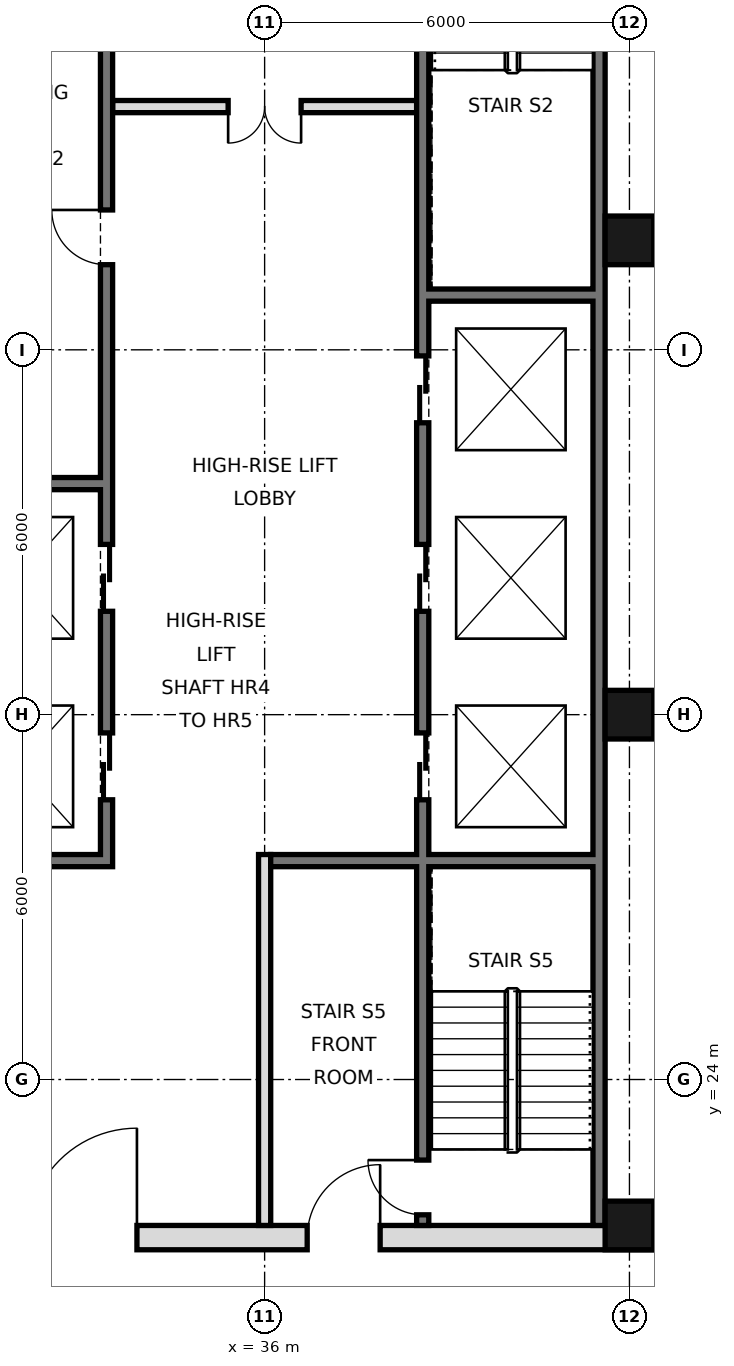
"""IFC4 building model, lengths in metres.
Left out: names, types, materials, properties, quantities, classifications, styles, units other than length and angle.
Written with IfcOpenShell. Run it as: python <this file> out.ifc"""

import sys

from ifc_helpers import new_model, si_unit, direction, frame, frame_2d, origin, origin_2d, place, context, subcontext, project, spatial, rectangle, hollow_rectangle, extrude, element, fill, save


model = new_model("IFC4")
c1 = context("Model", 3, precision=1e-05, world=origin(), true_north=direction((0.0, 1.0)))
c2 = subcontext(c1, "Body", "Model", "MODEL_VIEW")
j1 = project(units=[si_unit("LENGTHUNIT", "METRE"), si_unit("PLANEANGLEUNIT", "RADIAN")], contexts=[c1])
p1 = place(None, origin())
s1 = spatial("IfcSite", under=j1, at=p1, CompositionType="ELEMENT")
p2 = place(p1, origin())
s2 = spatial("IfcBuilding", under=s1, at=p2, CompositionType="ELEMENT")
p3 = place(p2, frame((0.0, 0.0, 323.2)))
s3 = spatial("IfcBuildingStorey", under=s2, at=p3, CompositionType="ELEMENT", Elevation=323.2)
for number, where, z_axis, x_axis in (
    (1, (42.0, 21.6, 0.0), (0.0, 0.0, 1.0), (1.0, 0.0, 0.0)),
    (2, (42.0, 30.0, 0.0), (0.0, 0.0, 1.0), (1.0, 0.0, 0.0)),
    (3, (42.0, 37.8, 0.0), (0.0, 0.0, 1.0), (1.0, 0.0, 0.0)),
):
    element("IfcColumn", number, at=place(p3, frame(where, z_axis=z_axis, x_axis=x_axis)), inside=s3, PredefinedType="COLUMN", context=c2, shape_type="SweptSolid", body=[
        extrude(hollow_rectangle(XDim=0.8, YDim=0.8, WallThickness=0.025, at=origin_2d()), origin(), (0.0, 0.0, 1.0), 3.6),
    ])
p4 = place(p3, frame((41.5, 21.6, 0.0), z_axis=(0.0, 0.0, 1.0), x_axis=(0.0, 1.0, 0.0)))
e4 = element("IfcWall", 4, at=p4, inside=s3, PredefinedType="SOLIDWALL", context=c2, shape_type="SweptSolid", body=[
    extrude(rectangle(XDim=23.5, YDim=0.2, at=frame_2d((11.75, 0.0))), origin(), (0.0, 0.0, 1.0), 3.42),
])
p5 = place(p3, frame((5.6, 21.4, 0.0), z_axis=(0.0, 0.0, 1.0), x_axis=(1.0, 0.0, 0.0)))
e5 = element("IfcWall", 5, at=p5, inside=s3, PredefinedType="SOLIDWALL", context=c2, shape_type="SweptSolid", body=[
    extrude(rectangle(XDim=36.8, YDim=0.4, at=frame_2d((18.4, 0.0))), origin(), (0.0, 0.0, 1.0), 3.42),
])
p6 = place(p5, frame((8.5, 0.0, 0.0)))
e6 = element("IfcOpeningElement", 6, at=p6, cuts=e5, PredefinedType="OPENING", context=c2, shape_type="SweptSolid", body=[
    extrude(rectangle(XDim=1.8, YDim=2.1, at=frame_2d((0.9, 1.05))), frame((0.0, 0.21, 0.0), z_axis=(0.0, -1.0, 0.0), x_axis=(1.0, 0.0, 0.0)), (0.0, 0.0, 1.0), 0.42),
])
p7 = place(p5, frame((17.5, 0.0, 0.0)))
e7 = element("IfcOpeningElement", 7, at=p7, cuts=e5, PredefinedType="OPENING", context=c2, shape_type="SweptSolid", body=[
    extrude(rectangle(XDim=1.8, YDim=2.1, at=frame_2d((0.9, 1.05))), frame((0.0, 0.21, 0.0), z_axis=(0.0, -1.0, 0.0), x_axis=(1.0, 0.0, 0.0)), (0.0, 0.0, 1.0), 0.42),
])
p8 = place(p5, frame((26.5, 0.0, 0.0)))
e8 = element("IfcOpeningElement", 8, at=p8, cuts=e5, PredefinedType="OPENING", context=c2, shape_type="SweptSolid", body=[
    extrude(rectangle(XDim=1.8, YDim=2.1, at=frame_2d((0.9, 1.05))), frame((0.0, 0.21, 0.0), z_axis=(0.0, -1.0, 0.0), x_axis=(1.0, 0.0, 0.0)), (0.0, 0.0, 1.0), 0.42),
])
p9 = place(p5, frame((4.5, 0.0, 0.0)))
e9 = element("IfcOpeningElement", 9, at=p9, cuts=e5, PredefinedType="OPENING", context=c2, shape_type="SweptSolid", body=[
    extrude(rectangle(XDim=1.2, YDim=2.1, at=frame_2d((0.6, 1.05))), frame((0.0, 0.21, 0.0), z_axis=(0.0, -1.0, 0.0), x_axis=(1.0, 0.0, 0.0)), (0.0, 0.0, 1.0), 0.42),
])
p10 = place(p5, frame((31.1, 0.0, 0.0)))
e10 = element("IfcOpeningElement", 10, at=p10, cuts=e5, PredefinedType="OPENING", context=c2, shape_type="SweptSolid", body=[
    extrude(rectangle(XDim=1.2, YDim=2.1, at=frame_2d((0.6, 1.05))), frame((0.0, 0.21, 0.0), z_axis=(0.0, -1.0, 0.0), x_axis=(1.0, 0.0, 0.0)), (0.0, 0.0, 1.0), 0.42),
])
p11 = place(p3, frame((33.4, 27.5, 0.0), z_axis=(0.0, 0.0, 1.0), x_axis=(0.0, 1.0, 0.0)))
e11 = element("IfcWall", 11, at=p11, inside=s3, PredefinedType="SOLIDWALL", context=c2, shape_type="SweptSolid", body=[
    extrude(rectangle(XDim=17.5, YDim=0.2, at=frame_2d((8.75, 0.0))), origin(), (0.0, 0.0, 1.0), 3.42),
])
p12 = place(p11, frame((1.1, 0.0, 0.0)))
e12 = element("IfcOpeningElement", 12, at=p12, cuts=e11, PredefinedType="OPENING", context=c2, shape_type="SweptSolid", body=[
    extrude(rectangle(XDim=1.1, YDim=2.1, at=frame_2d((0.55, 1.05))), frame((0.0, 0.11, 0.0), z_axis=(0.0, -1.0, 0.0), x_axis=(1.0, 0.0, 0.0)), (0.0, 0.0, 1.0), 0.22),
])
p13 = place(p11, frame((4.2, 0.0, 0.0)))
e13 = element("IfcOpeningElement", 13, at=p13, cuts=e11, PredefinedType="OPENING", context=c2, shape_type="SweptSolid", body=[
    extrude(rectangle(XDim=1.1, YDim=2.1, at=frame_2d((0.55, 1.05))), frame((0.0, 0.11, 0.0), z_axis=(0.0, -1.0, 0.0), x_axis=(1.0, 0.0, 0.0)), (0.0, 0.0, 1.0), 0.22),
])
p14 = place(p11, frame((15.4, 0.0, 0.0)))
e14 = element("IfcOpeningElement", 14, at=p14, cuts=e11, PredefinedType="OPENING", context=c2, shape_type="SweptSolid", body=[
    extrude(rectangle(XDim=1.1, YDim=2.1, at=frame_2d((0.55, 1.05))), frame((0.0, 0.11, 0.0), z_axis=(0.0, -1.0, 0.0), x_axis=(1.0, 0.0, 0.0)), (0.0, 0.0, 1.0), 0.22),
])
p15 = place(p11, frame((9.9, 0.0, 0.0)))
e15 = element("IfcOpeningElement", 15, at=p15, cuts=e11, PredefinedType="OPENING", context=c2, shape_type="SweptSolid", body=[
    extrude(rectangle(XDim=0.9, YDim=2.1, at=frame_2d((0.45, 1.05))), frame((0.0, 0.11, 0.0), z_axis=(0.0, -1.0, 0.0), x_axis=(1.0, 0.0, 0.0)), (0.0, 0.0, 1.0), 0.22),
])
p16 = place(p3, frame((36.0, 21.6, 0.0), z_axis=(0.0, 0.0, 1.0), x_axis=(0.0, 1.0, 0.0)))
e16 = element("IfcWall", 16, at=p16, inside=s3, PredefinedType="PARTITIONING", context=c2, shape_type="SweptSolid", body=[
    extrude(rectangle(XDim=6.1, YDim=0.2, at=frame_2d((3.05, 0.0))), origin(), (0.0, 0.0, 1.0), 3.42),
])
p17 = place(p3, frame((38.6, 21.6, 0.0), z_axis=(0.0, 0.0, 1.0), x_axis=(0.0, 1.0, 0.0)))
e17 = element("IfcWall", 17, at=p17, inside=s3, PredefinedType="SOLIDWALL", context=c2, shape_type="SweptSolid", body=[
    extrude(rectangle(XDim=23.4, YDim=0.2, at=frame_2d((11.7, 0.0))), origin(), (0.0, 0.0, 1.0), 3.42),
])
p18 = place(p17, frame((7.0, 0.0, 0.0)))
e18 = element("IfcOpeningElement", 18, at=p18, cuts=e17, PredefinedType="OPENING", context=c2, shape_type="SweptSolid", body=[
    extrude(rectangle(XDim=1.1, YDim=2.1, at=frame_2d((0.55, 1.05))), frame((0.0, 0.11, 0.0), z_axis=(0.0, -1.0, 0.0), x_axis=(1.0, 0.0, 0.0)), (0.0, 0.0, 1.0), 0.22),
])
p19 = place(p17, frame((10.1, 0.0, 0.0)))
e19 = element("IfcOpeningElement", 19, at=p19, cuts=e17, PredefinedType="OPENING", context=c2, shape_type="SweptSolid", body=[
    extrude(rectangle(XDim=1.1, YDim=2.1, at=frame_2d((0.55, 1.05))), frame((0.0, 0.11, 0.0), z_axis=(0.0, -1.0, 0.0), x_axis=(1.0, 0.0, 0.0)), (0.0, 0.0, 1.0), 0.22),
])
p20 = place(p17, frame((13.2, 0.0, 0.0)))
e20 = element("IfcOpeningElement", 20, at=p20, cuts=e17, PredefinedType="OPENING", context=c2, shape_type="SweptSolid", body=[
    extrude(rectangle(XDim=1.1, YDim=2.1, at=frame_2d((0.55, 1.05))), frame((0.0, 0.11, 0.0), z_axis=(0.0, -1.0, 0.0), x_axis=(1.0, 0.0, 0.0)), (0.0, 0.0, 1.0), 0.22),
])
p21 = place(p17, frame((22.1, 0.0, 0.0)))
e21 = element("IfcOpeningElement", 21, at=p21, cuts=e17, PredefinedType="OPENING", context=c2, shape_type="SweptSolid", body=[
    extrude(rectangle(XDim=1.0, YDim=2.1, at=frame_2d((0.5, 1.05))), frame((0.0, 0.11, 0.0), z_axis=(0.0, -1.0, 0.0), x_axis=(1.0, 0.0, 0.0)), (0.0, 0.0, 1.0), 0.22),
])
p22 = place(p17, frame((0.175, 0.0, 0.0)))
e22 = element("IfcOpeningElement", 22, at=p22, cuts=e17, PredefinedType="OPENING", context=c2, shape_type="SweptSolid", body=[
    extrude(rectangle(XDim=0.9, YDim=2.1, at=frame_2d((0.45, 1.05))), frame((0.0, 0.11, 0.0), z_axis=(0.0, -1.0, 0.0), x_axis=(1.0, 0.0, 0.0)), (0.0, 0.0, 1.0), 0.22),
])
p23 = place(p3, frame((30.6, 27.6, 0.0), z_axis=(0.0, 0.0, 1.0), x_axis=(1.0, 0.0, 0.0)))
e23 = element("IfcWall", 23, at=p23, inside=s3, PredefinedType="SOLIDWALL", context=c2, shape_type="SweptSolid", body=[
    extrude(rectangle(XDim=2.7, YDim=0.2, at=frame_2d((1.35, 0.0))), origin(), (0.0, 0.0, 1.0), 3.42),
])
p24 = place(p3, frame((36.1, 27.6, 0.0), z_axis=(0.0, 0.0, 1.0), x_axis=(1.0, 0.0, 0.0)))
e24 = element("IfcWall", 24, at=p24, inside=s3, PredefinedType="SOLIDWALL", context=c2, shape_type="SweptSolid", body=[
    extrude(rectangle(XDim=5.3, YDim=0.2, at=frame_2d((2.65, 0.0))), origin(), (0.0, 0.0, 1.0), 3.42),
])
for number, where, z_axis, x_axis in (
    (25, (30.6, 33.8, 0.0), (0.0, 0.0, 1.0), (1.0, 0.0, 0.0)),
    (26, (38.7, 36.9, 0.0), (0.0, 0.0, 1.0), (1.0, 0.0, 0.0)),
):
    element("IfcWall", number, at=place(p3, frame(where, z_axis=z_axis, x_axis=x_axis)), inside=s3, PredefinedType="SOLIDWALL", context=c2, shape_type="SweptSolid", body=[
        extrude(rectangle(XDim=2.7, YDim=0.2, at=frame_2d((1.35, 0.0))), origin(), (0.0, 0.0, 1.0), 3.42),
    ])
p25 = place(p3, frame((33.5, 40.0, 0.0), z_axis=(0.0, 0.0, 1.0), x_axis=(1.0, 0.0, 0.0)))
e27 = element("IfcWall", 27, at=p25, inside=s3, PredefinedType="PARTITIONING", context=c2, shape_type="SweptSolid", body=[
    extrude(rectangle(XDim=5.0, YDim=0.2, at=frame_2d((2.5, 0.0))), origin(), (0.0, 0.0, 1.0), 3.42),
])
p26 = place(p25, frame((1.9, 0.0, 0.0)))
e28 = element("IfcOpeningElement", 28, at=p26, cuts=e27, PredefinedType="OPENING", context=c2, shape_type="SweptSolid", body=[
    extrude(rectangle(XDim=1.2, YDim=2.1, at=frame_2d((0.6, 1.05))), frame((0.0, 0.11, 0.0), z_axis=(0.0, -1.0, 0.0), x_axis=(1.0, 0.0, 0.0)), (0.0, 0.0, 1.0), 0.22),
])
p27 = place(p8, frame((1.8, 0.0, 0.0), z_axis=(0.0, 0.0, 1.0), x_axis=(-1.0, 0.0, 0.0)))
e29 = element("IfcDoor", 29, at=p27, inside=s3, OperationType="SINGLE_SWING_LEFT", PredefinedType="DOOR", context=c2, shape_type="SweptSolid", body=[
    extrude(rectangle(XDim=1.8, YDim=2.1, at=frame_2d((0.9, 1.05))), frame((0.0, 0.025, 0.0), z_axis=(0.0, -1.0, 0.0), x_axis=(1.0, 0.0, 0.0)), (0.0, 0.0, 1.0), 0.05),
])
fill(e8, e29)
p28 = place(p10, frame((1.2, 0.0, 0.0), z_axis=(0.0, 0.0, 1.0), x_axis=(-1.0, 0.0, 0.0)))
e30 = element("IfcDoor", 30, at=p28, inside=s3, OperationType="SINGLE_SWING_LEFT", PredefinedType="DOOR", context=c2, shape_type="SweptSolid", body=[
    extrude(rectangle(XDim=1.2, YDim=2.1, at=frame_2d((0.6, 1.05))), frame((0.0, 0.025, 0.0), z_axis=(0.0, -1.0, 0.0), x_axis=(1.0, 0.0, 0.0)), (0.0, 0.0, 1.0), 0.05),
])
fill(e10, e30)
p29 = place(p26, frame((1.2, 0.0, 0.0), z_axis=(0.0, 0.0, 1.0), x_axis=(-1.0, 0.0, 0.0)))
e31 = element("IfcDoor", 31, at=p29, inside=s3, OperationType="DOUBLE_DOOR_SINGLE_SWING", PredefinedType="DOOR", context=c2, shape_type="SweptSolid", body=[
    extrude(rectangle(XDim=1.2, YDim=2.1, at=frame_2d((0.6, 1.05))), frame((0.0, 0.025, 0.0), z_axis=(0.0, -1.0, 0.0), x_axis=(1.0, 0.0, 0.0)), (0.0, 0.0, 1.0), 0.05),
])
fill(e28, e31)
p30 = place(p18, origin())
e32 = element("IfcDoor", 32, at=p30, inside=s3, OperationType="DOUBLE_DOOR_SLIDING", PredefinedType="DOOR", context=c2, shape_type="SweptSolid", body=[
    extrude(rectangle(XDim=1.1, YDim=2.1, at=frame_2d((0.55, 1.05))), frame((0.0, 0.025, 0.0), z_axis=(0.0, -1.0, 0.0), x_axis=(1.0, 0.0, 0.0)), (0.0, 0.0, 1.0), 0.05),
])
fill(e18, e32)
p31 = place(p19, origin())
e33 = element("IfcDoor", 33, at=p31, inside=s3, OperationType="DOUBLE_DOOR_SLIDING", PredefinedType="DOOR", context=c2, shape_type="SweptSolid", body=[
    extrude(rectangle(XDim=1.1, YDim=2.1, at=frame_2d((0.55, 1.05))), frame((0.0, 0.025, 0.0), z_axis=(0.0, -1.0, 0.0), x_axis=(1.0, 0.0, 0.0)), (0.0, 0.0, 1.0), 0.05),
])
fill(e19, e33)
p32 = place(p20, origin())
e34 = element("IfcDoor", 34, at=p32, inside=s3, OperationType="DOUBLE_DOOR_SLIDING", PredefinedType="DOOR", context=c2, shape_type="SweptSolid", body=[
    extrude(rectangle(XDim=1.1, YDim=2.1, at=frame_2d((0.55, 1.05))), frame((0.0, 0.025, 0.0), z_axis=(0.0, -1.0, 0.0), x_axis=(1.0, 0.0, 0.0)), (0.0, 0.0, 1.0), 0.05),
])
fill(e20, e34)
p33 = place(p12, origin())
e35 = element("IfcDoor", 35, at=p33, inside=s3, OperationType="DOUBLE_DOOR_SLIDING", PredefinedType="DOOR", context=c2, shape_type="SweptSolid", body=[
    extrude(rectangle(XDim=1.1, YDim=2.1, at=frame_2d((0.55, 1.05))), frame((0.0, 0.025, 0.0), z_axis=(0.0, -1.0, 0.0), x_axis=(1.0, 0.0, 0.0)), (0.0, 0.0, 1.0), 0.05),
])
fill(e12, e35)
p34 = place(p13, origin())
e36 = element("IfcDoor", 36, at=p34, inside=s3, OperationType="DOUBLE_DOOR_SLIDING", PredefinedType="DOOR", context=c2, shape_type="SweptSolid", body=[
    extrude(rectangle(XDim=1.1, YDim=2.1, at=frame_2d((0.55, 1.05))), frame((0.0, 0.025, 0.0), z_axis=(0.0, -1.0, 0.0), x_axis=(1.0, 0.0, 0.0)), (0.0, 0.0, 1.0), 0.05),
])
fill(e13, e36)
p35 = place(p22, frame((0.9, 0.0, 0.0), z_axis=(0.0, 0.0, 1.0), x_axis=(-1.0, 0.0, 0.0)))
e37 = element("IfcDoor", 37, at=p35, inside=s3, OperationType="SINGLE_SWING_LEFT", PredefinedType="DOOR", context=c2, shape_type="SweptSolid", body=[
    extrude(rectangle(XDim=0.9, YDim=2.1, at=frame_2d((0.45, 1.05))), frame((0.0, 0.025, 0.0), z_axis=(0.0, -1.0, 0.0), x_axis=(1.0, 0.0, 0.0)), (0.0, 0.0, 1.0), 0.05),
])
fill(e22, e37)
p36 = place(p15, frame((0.9, 0.0, 0.0), z_axis=(0.0, 0.0, 1.0), x_axis=(-1.0, 0.0, 0.0)))
e38 = element("IfcDoor", 38, at=p36, inside=s3, OperationType="SINGLE_SWING_LEFT", PredefinedType="DOOR", context=c2, shape_type="SweptSolid", body=[
    extrude(rectangle(XDim=0.9, YDim=2.1, at=frame_2d((0.45, 1.05))), frame((0.0, 0.025, 0.0), z_axis=(0.0, -1.0, 0.0), x_axis=(1.0, 0.0, 0.0)), (0.0, 0.0, 1.0), 0.05),
])
fill(e15, e38)
save(model, sys.argv[1])
